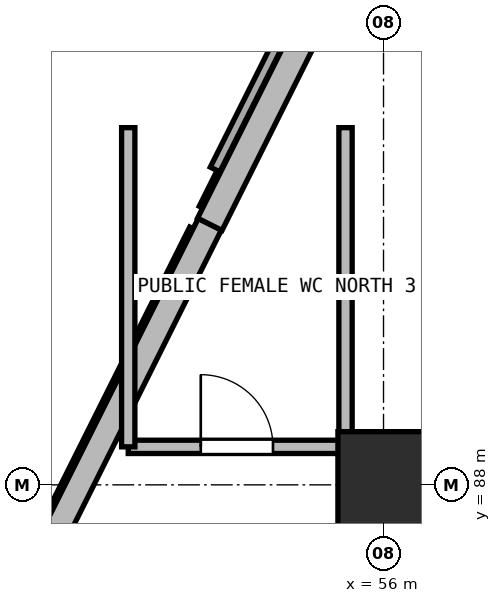
"""IFC4 building model, lengths in metres.
Left out: names, types, materials, properties, quantities, classifications, styles, units other than length and angle.
Written with IfcOpenShell. Run it as: python <this file> out.ifc"""

import sys

from ifc_helpers import new_model, si_unit, direction, frame, frame_2d, origin, origin_2d, place, context, subcontext, project, spatial, rectangle, extrude, element, fill, save


model = new_model("IFC4")
c1 = context("Model", 3, precision=1e-05, world=origin(), true_north=direction((0.0, 1.0)))
c2 = subcontext(c1, "Body", "Model", "MODEL_VIEW")
j1 = project(units=[si_unit("LENGTHUNIT", "METRE"), si_unit("PLANEANGLEUNIT", "RADIAN")], contexts=[c1])
p1 = place(None, origin())
s1 = spatial("IfcSite", under=j1, at=p1, CompositionType="ELEMENT")
p2 = place(p1, origin())
s2 = spatial("IfcBuilding", under=s1, at=p2, CompositionType="ELEMENT")
p3 = place(p2, frame((0.0, 0.0, 5.4)))
s3 = spatial("IfcBuildingStorey", under=s2, at=p3, CompositionType="ELEMENT", Elevation=5.4)
p4 = place(p3, frame((56.0, 88.0, 0.0), z_axis=(0.0, 0.0, 1.0), x_axis=(1.0, 0.0, 0.0)))
e1 = element("IfcColumn", 1, at=p4, inside=s3, PredefinedType="COLUMN", context=c2, shape_type="SweptSolid", body=[
    extrude(rectangle(XDim=1.2, YDim=1.4, at=origin_2d()), origin(), (0.0, 0.0, 1.0), 4.8),
])
p5 = place(p3, frame((50.286, 84.571, 0.0), z_axis=(0.0, 0.0, 1.0), x_axis=(0.4472135955, 0.894427191, 0.0)))
e2 = element("IfcWall", 2, at=p5, inside=s3, PredefinedType="SOLIDWALL", context=c2, shape_type="SweptSolid", body=[
    extrude(rectangle(XDim=7.667, YDim=0.34, at=frame_2d((3.833, 0.0))), origin(), (0.0, 0.0, 1.0), 3.45),
])
p6 = place(p3, frame((53.714, 91.429, 0.0), z_axis=(0.0, 0.0, 1.0), x_axis=(0.447191148821, 0.894438413987, 0.0)))
e3 = element("IfcWall", 3, at=p6, inside=s3, PredefinedType="SOLIDWALL", context=c2, shape_type="SweptSolid", body=[
    extrude(rectangle(XDim=4.351, YDim=0.36, at=frame_2d((2.175, 0.0))), origin(), (0.0, 0.0, 1.0), 3.45),
])
p7 = place(p3, frame((52.641, 88.5, 0.0), z_axis=(0.0, 0.0, 1.0), x_axis=(1.0, 0.0, 0.0)))
e4 = element("IfcWall", 4, at=p7, inside=s3, PredefinedType="PARTITIONING", context=c2, shape_type="SweptSolid", body=[
    extrude(rectangle(XDim=2.859, YDim=0.175, at=frame_2d((1.429, 0.0))), origin(), (0.0, 0.0, 1.0), 4.48),
])
p8 = place(p7, frame((0.954, 0.0, 0.0)))
e5 = element("IfcOpeningElement", 5, at=p8, cuts=e4, PredefinedType="OPENING", context=c2, shape_type="SweptSolid", body=[
    extrude(rectangle(XDim=0.95, YDim=2.15, at=frame_2d((0.475, 1.075))), frame((0.0, 0.098, 0.0), z_axis=(0.0, -1.0, 0.0), x_axis=(1.0, 0.0, 0.0)), (0.0, 0.0, 1.0), 0.195),
])
p9 = place(p3, frame((55.5, 88.5, 0.0), z_axis=(0.0, 0.0, 1.0), x_axis=(0.0, 1.0, 0.0)))
e6 = element("IfcWall", 6, at=p9, inside=s3, PredefinedType="PARTITIONING", context=c2, shape_type="SweptSolid", body=[
    extrude(rectangle(XDim=4.2, YDim=0.175, at=frame_2d((2.1, 0.0))), origin(), (0.0, 0.0, 1.0), 3.6),
])
p10 = place(p3, frame((52.641, 92.7, 0.0), z_axis=(0.0, 0.0, 1.0), x_axis=(0.0, -1.0, 0.0)))
e7 = element("IfcWall", 7, at=p10, inside=s3, PredefinedType="PARTITIONING", context=c2, shape_type="SweptSolid", body=[
    extrude(rectangle(XDim=4.2, YDim=0.175, at=frame_2d((2.1, 0.0))), origin(), (0.0, 0.0, 1.0), 4.48),
])
p11 = place(p8, origin())
e8 = element("IfcDoor", 8, at=p11, inside=s3, OperationType="SINGLE_SWING_LEFT", PredefinedType="DOOR", context=c2, shape_type="SweptSolid", body=[
    extrude(rectangle(XDim=0.95, YDim=2.15, at=frame_2d((0.475, 1.075))), frame((0.0, 0.025, 0.0), z_axis=(0.0, -1.0, 0.0), x_axis=(1.0, 0.0, 0.0)), (0.0, 0.0, 1.0), 0.05),
])
fill(e5, e8)
save(model, sys.argv[1])
